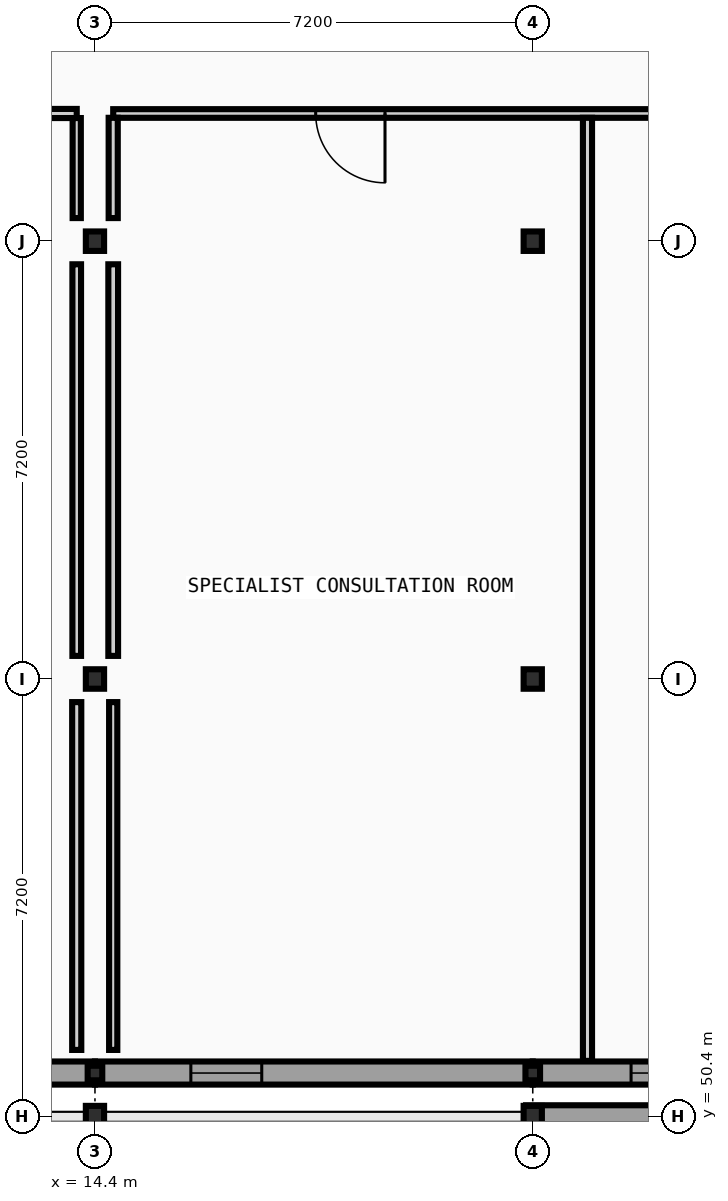
"""IFC4 building model, lengths in metres.
Left out: names, types, materials, properties, quantities, classifications, styles, units other than length and angle.
Written with IfcOpenShell. Run it as: python <this file> out.ifc"""

import sys

from ifc_helpers import new_model, si_unit, direction, frame, frame_2d, origin, origin_2d, place, context, subcontext, project, spatial, rectangle, i_section, extrude, element, fill, save


model = new_model("IFC4")
c1 = context("Model", 3, precision=1e-05, world=origin(), true_north=direction((0.0, 1.0)))
c2 = subcontext(c1, "Body", "Model", "MODEL_VIEW")
j1 = project(units=[si_unit("LENGTHUNIT", "METRE"), si_unit("PLANEANGLEUNIT", "RADIAN")], contexts=[c1])
p1 = place(None, origin())
s1 = spatial("IfcSite", under=j1, at=p1, CompositionType="ELEMENT")
p2 = place(p1, origin())
s2 = spatial("IfcBuilding", under=s1, at=p2, CompositionType="ELEMENT")
p3 = place(p2, frame((0.0, 0.0, 9.6)))
s3 = spatial("IfcBuildingStorey", under=s2, at=p3, CompositionType="ELEMENT", Elevation=9.6)
p4 = place(p3, frame((14.4, 50.4, 0.0), z_axis=(0.0, 0.0, 1.0), x_axis=(1.0, 0.0, 0.0)))
e1 = element("IfcColumn", 1, at=p4, inside=s3, PredefinedType="COLUMN", context=c2, shape_type="SweptSolid", body=[
    extrude(i_section(OverallWidth=0.3, OverallDepth=0.36, WebThickness=0.012, FlangeThickness=0.022, FilletRadius=0.027, at=origin_2d()), origin(), (0.0, 0.0, 1.0), 4.4),
])
p5 = place(p3, frame((14.4, 51.12, 0.0), z_axis=(0.0, 0.0, 1.0), x_axis=(1.0, 0.0, 0.0)))
e2 = element("IfcColumn", 2, at=p5, inside=s3, PredefinedType="COLUMN", context=c2, shape_type="SweptSolid", body=[
    extrude(i_section(OverallWidth=0.24, OverallDepth=0.24, WebThickness=0.01, FlangeThickness=0.017, FilletRadius=0.021, at=origin_2d()), origin(), (0.0, 0.0, 1.0), 4.4),
])
for number, where, z_axis, x_axis in (
    (3, (14.4, 57.6, 0.0), (0.0, 0.0, 1.0), (1.0, 0.0, 0.0)),
    (4, (14.4, 64.8, 0.0), (0.0, 0.0, 1.0), (1.0, 0.0, 0.0)),
):
    element("IfcColumn", number, at=place(p3, frame(where, z_axis=z_axis, x_axis=x_axis)), inside=s3, PredefinedType="COLUMN", context=c2, shape_type="SweptSolid", body=[
        extrude(i_section(OverallWidth=0.3, OverallDepth=0.32, WebThickness=0.011, FlangeThickness=0.021, FilletRadius=0.027, at=origin_2d()), origin(), (0.0, 0.0, 1.0), 4.4),
    ])
p6 = place(p3, frame((21.6, 50.4, 0.0), z_axis=(0.0, 0.0, 1.0), x_axis=(1.0, 0.0, 0.0)))
e5 = element("IfcColumn", 5, at=p6, inside=s3, PredefinedType="COLUMN", context=c2, shape_type="SweptSolid", body=[
    extrude(i_section(OverallWidth=0.3, OverallDepth=0.36, WebThickness=0.012, FlangeThickness=0.022, FilletRadius=0.027, at=origin_2d()), origin(), (0.0, 0.0, 1.0), 4.4),
])
p7 = place(p3, frame((21.6, 51.12, 0.0), z_axis=(0.0, 0.0, 1.0), x_axis=(1.0, 0.0, 0.0)))
e6 = element("IfcColumn", 6, at=p7, inside=s3, PredefinedType="COLUMN", context=c2, shape_type="SweptSolid", body=[
    extrude(i_section(OverallWidth=0.24, OverallDepth=0.24, WebThickness=0.01, FlangeThickness=0.017, FilletRadius=0.021, at=origin_2d()), origin(), (0.0, 0.0, 1.0), 4.4),
])
for number, where, z_axis, x_axis in (
    (7, (21.6, 57.6, 0.0), (0.0, 0.0, 1.0), (1.0, 0.0, 0.0)),
    (8, (21.6, 64.8, 0.0), (0.0, 0.0, 1.0), (1.0, 0.0, 0.0)),
):
    element("IfcColumn", number, at=place(p3, frame(where, z_axis=z_axis, x_axis=x_axis)), inside=s3, PredefinedType="COLUMN", context=c2, shape_type="SweptSolid", body=[
        extrude(i_section(OverallWidth=0.3, OverallDepth=0.32, WebThickness=0.011, FlangeThickness=0.021, FilletRadius=0.027, at=origin_2d()), origin(), (0.0, 0.0, 1.0), 4.4),
    ])
p8 = place(p3, frame((28.8, 50.4, 0.0), z_axis=(0.0, 0.0, 1.0), x_axis=(-1.0, 0.0, 0.0)))
e9 = element("IfcWall", 9, at=p8, inside=s3, PredefinedType="STANDARD", context=c2, shape_type="SweptSolid", body=[
    extrude(rectangle(XDim=7.31, YDim=0.38, at=frame_2d((3.655, 0.0))), origin(), (0.0, 0.0, 1.0), 3.895),
])
p9 = place(p8, frame((1.576, 0.0, 0.95)))
e10 = element("IfcOpeningElement", 10, at=p9, cuts=e9, PredefinedType="OPENING", context=c2, shape_type="SweptSolid", body=[
    extrude(rectangle(XDim=1.234, YDim=1.296, at=frame_2d((0.617, 0.648))), frame((0.0, 0.2, 0.0), z_axis=(0.0, -1.0, 0.0), x_axis=(1.0, 0.0, 0.0)), (0.0, 0.0, 1.0), 0.4),
])
p10 = place(p3, frame((7.2, 51.12, 0.0), z_axis=(0.0, 0.0, 1.0), x_axis=(1.0, 0.0, 0.0)))
e11 = element("IfcWall", 11, at=p10, inside=s3, PredefinedType="STANDARD", context=c2, shape_type="SweptSolid", body=[
    extrude(rectangle(XDim=7.2, YDim=0.38, at=frame_2d((3.6, 0.0))), origin(), (0.0, 0.0, 1.0), 3.875),
])
p11 = place(p10, frame((4.474, 0.0, 0.95)))
e12 = element("IfcOpeningElement", 12, at=p11, cuts=e11, PredefinedType="OPENING", context=c2, shape_type="SweptSolid", body=[
    extrude(rectangle(XDim=1.132, YDim=1.26, at=frame_2d((0.566, 0.63))), frame((0.0, 0.2, 0.0), z_axis=(0.0, -1.0, 0.0), x_axis=(1.0, 0.0, 0.0)), (0.0, 0.0, 1.0), 0.4),
])
p12 = place(p3, frame((14.4, 51.12, 0.0), z_axis=(0.0, 0.0, 1.0), x_axis=(1.0, 0.0, 0.0)))
e13 = element("IfcWall", 13, at=p12, inside=s3, PredefinedType="STANDARD", context=c2, shape_type="SweptSolid", body=[
    extrude(rectangle(XDim=7.2, YDim=0.38, at=frame_2d((3.6, 0.0))), origin(), (0.0, 0.0, 1.0), 3.875),
])
p13 = place(p12, frame((1.577, 0.0, 0.95)))
e14 = element("IfcOpeningElement", 14, at=p13, cuts=e13, PredefinedType="OPENING", context=c2, shape_type="SweptSolid", body=[
    extrude(rectangle(XDim=1.166, YDim=1.26, at=frame_2d((0.583, 0.63))), frame((0.0, 0.2, 0.0), z_axis=(0.0, -1.0, 0.0), x_axis=(1.0, 0.0, 0.0)), (0.0, 0.0, 1.0), 0.4),
])
p14 = place(p3, frame((21.6, 51.12, 0.0), z_axis=(0.0, 0.0, 1.0), x_axis=(1.0, 0.0, 0.0)))
e15 = element("IfcWall", 15, at=p14, inside=s3, PredefinedType="STANDARD", context=c2, shape_type="SweptSolid", body=[
    extrude(rectangle(XDim=7.39, YDim=0.38, at=frame_2d((3.695, 0.0))), origin(), (0.0, 0.0, 1.0), 3.875),
])
p15 = place(p14, frame((1.617, 0.0, 0.95)))
e16 = element("IfcOpeningElement", 16, at=p15, cuts=e15, PredefinedType="OPENING", context=c2, shape_type="SweptSolid", body=[
    extrude(rectangle(XDim=1.2, YDim=1.26, at=frame_2d((0.6, 0.63))), frame((0.0, 0.2, 0.0), z_axis=(0.0, -1.0, 0.0), x_axis=(1.0, 0.0, 0.0)), (0.0, 0.0, 1.0), 0.4),
])
p16 = place(p14, frame((4.573, 0.0, 0.95)))
e17 = element("IfcOpeningElement", 17, at=p16, cuts=e15, PredefinedType="OPENING", context=c2, shape_type="SweptSolid", body=[
    extrude(rectangle(XDim=1.2, YDim=1.26, at=frame_2d((0.6, 0.63))), frame((0.0, 0.2, 0.0), z_axis=(0.0, -1.0, 0.0), x_axis=(1.0, 0.0, 0.0)), (0.0, 0.0, 1.0), 0.4),
])
p17 = place(p3, frame((10.65, 66.9, 0.0), z_axis=(0.0, 0.0, 1.0), x_axis=(1.0, 0.0, 0.0)))
e18 = element("IfcWall", 18, at=p17, inside=s3, PredefinedType="PARTITIONING", context=c2, shape_type="SweptSolid", body=[
    extrude(rectangle(XDim=3.45, YDim=0.15, at=frame_2d((1.725, 0.0))), origin(), (0.0, 0.0, 1.0), 4.2),
])
p18 = place(p17, frame((0.45, 0.0, 0.0)))
e19 = element("IfcOpeningElement", 19, at=p18, cuts=e18, PredefinedType="OPENING", context=c2, shape_type="SweptSolid", body=[
    extrude(rectangle(XDim=1.036, YDim=2.152, at=frame_2d((0.518, 1.076))), frame((0.0, 0.085, 0.0), z_axis=(0.0, -1.0, 0.0), x_axis=(1.0, 0.0, 0.0)), (0.0, 0.0, 1.0), 0.17),
])
p19 = place(p3, frame((14.7, 66.9, 0.0), z_axis=(0.0, 0.0, 1.0), x_axis=(1.0, 0.0, 0.0)))
e20 = element("IfcWall", 20, at=p19, inside=s3, PredefinedType="PARTITIONING", context=c2, shape_type="SweptSolid", body=[
    extrude(rectangle(XDim=13.9, YDim=0.142, at=frame_2d((6.95, 0.0))), origin(), (0.0, 0.0, 1.0), 4.2),
])
p20 = place(p19, frame((10.293, 0.0, 0.0)))
e21 = element("IfcOpeningElement", 21, at=p20, cuts=e20, PredefinedType="OPENING", context=c2, shape_type="SweptSolid", body=[
    extrude(rectangle(XDim=1.114, YDim=2.152, at=frame_2d((0.557, 1.076))), frame((0.0, 0.081, 0.0), z_axis=(0.0, -1.0, 0.0), x_axis=(1.0, 0.0, 0.0)), (0.0, 0.0, 1.0), 0.162),
])
p21 = place(p19, frame((3.33, 0.0, 0.0)))
e22 = element("IfcOpeningElement", 22, at=p21, cuts=e20, PredefinedType="OPENING", context=c2, shape_type="SweptSolid", body=[
    extrude(rectangle(XDim=1.14, YDim=2.152, at=frame_2d((0.57, 1.076))), frame((0.0, 0.081, 0.0), z_axis=(0.0, -1.0, 0.0), x_axis=(1.0, 0.0, 0.0)), (0.0, 0.0, 1.0), 0.162),
])
p22 = place(p3, frame((14.1, 51.5, 0.0), z_axis=(0.0, 0.0, 1.0), x_axis=(0.0, 1.0, 0.0)))
e23 = element("IfcWall", 23, at=p22, inside=s3, PredefinedType="PARTITIONING", context=c2, shape_type="SweptSolid", body=[
    extrude(rectangle(XDim=5.72, YDim=0.15, at=frame_2d((2.86, 0.0))), origin(), (0.0, 0.0, 1.0), 3.875),
])
p23 = place(p3, frame((14.1, 57.98, 0.0), z_axis=(0.0, 0.0, 1.0), x_axis=(0.0, 1.0, 0.0)))
e24 = element("IfcWall", 24, at=p23, inside=s3, PredefinedType="PARTITIONING", context=c2, shape_type="SweptSolid", body=[
    extrude(rectangle(XDim=6.44, YDim=0.142, at=frame_2d((3.22, 0.0))), origin(), (0.0, 0.0, 1.0), 3.895),
])
p24 = place(p3, frame((14.1, 65.18, 0.0), z_axis=(0.0, 0.0, 1.0), x_axis=(0.0, 1.0, 0.0)))
e25 = element("IfcWall", 25, at=p24, inside=s3, PredefinedType="PARTITIONING", context=c2, shape_type="SweptSolid", body=[
    extrude(rectangle(XDim=1.645, YDim=0.135, at=frame_2d((0.823, 0.0))), origin(), (0.0, 0.0, 1.0), 4.2),
])
p25 = place(p3, frame((14.7, 51.5, 0.0), z_axis=(0.0, 0.0, 1.0), x_axis=(0.0, 1.0, 0.0)))
e26 = element("IfcWall", 26, at=p25, inside=s3, PredefinedType="PARTITIONING", context=c2, shape_type="SweptSolid", body=[
    extrude(rectangle(XDim=5.72, YDim=0.135, at=frame_2d((2.86, 0.0))), origin(), (0.0, 0.0, 1.0), 4.2),
])
p26 = place(p3, frame((14.7, 57.98, 0.0), z_axis=(0.0, 0.0, 1.0), x_axis=(0.0, 1.0, 0.0)))
e27 = element("IfcWall", 27, at=p26, inside=s3, PredefinedType="PARTITIONING", context=c2, shape_type="SweptSolid", body=[
    extrude(rectangle(XDim=6.44, YDim=0.16, at=frame_2d((3.22, 0.0))), origin(), (0.0, 0.0, 1.0), 3.895),
])
p27 = place(p3, frame((14.7, 65.18, 0.0), z_axis=(0.0, 0.0, 1.0), x_axis=(0.0, 1.0, 0.0)))
e28 = element("IfcWall", 28, at=p27, inside=s3, PredefinedType="PARTITIONING", context=c2, shape_type="SweptSolid", body=[
    extrude(rectangle(XDim=1.649, YDim=0.15, at=frame_2d((0.825, 0.0))), origin(), (0.0, 0.0, 1.0), 3.895),
])
p28 = place(p3, frame((22.5, 51.32, 0.0), z_axis=(0.0, 0.0, 1.0), x_axis=(0.0, 1.0, 0.0)))
e29 = element("IfcWall", 29, at=p28, inside=s3, PredefinedType="PARTITIONING", context=c2, shape_type="SweptSolid", body=[
    extrude(rectangle(XDim=15.509, YDim=0.15, at=frame_2d((7.754, 0.0))), origin(), (0.0, 0.0, 1.0), 4.2),
])
p29 = place(p13, origin())
e30 = element("IfcWindow", 30, at=p29, inside=s3, PartitioningType="SINGLE_PANEL", PredefinedType="WINDOW", context=c2, shape_type="SweptSolid", body=[
    extrude(rectangle(XDim=1.166, YDim=1.26, at=frame_2d((0.583, 0.63))), frame((0.0, 0.03, 0.0), z_axis=(0.0, -1.0, 0.0), x_axis=(1.0, 0.0, 0.0)), (0.0, 0.0, 1.0), 0.06),
])
fill(e14, e30)
p30 = place(p15, origin())
e31 = element("IfcWindow", 31, at=p30, inside=s3, PartitioningType="SINGLE_PANEL", PredefinedType="WINDOW", context=c2, shape_type="SweptSolid", body=[
    extrude(rectangle(XDim=1.2, YDim=1.26, at=frame_2d((0.6, 0.63))), frame((0.0, 0.03, 0.0), z_axis=(0.0, -1.0, 0.0), x_axis=(1.0, 0.0, 0.0)), (0.0, 0.0, 1.0), 0.06),
])
fill(e16, e31)
p31 = place(p21, origin())
e32 = element("IfcDoor", 32, at=p31, inside=s3, OperationType="SINGLE_SWING_RIGHT", PredefinedType="DOOR", context=c2, shape_type="SweptSolid", body=[
    extrude(rectangle(XDim=1.14, YDim=2.152, at=frame_2d((0.57, 1.076))), frame((0.0, 0.025, 0.0), z_axis=(0.0, -1.0, 0.0), x_axis=(1.0, 0.0, 0.0)), (0.0, 0.0, 1.0), 0.05),
])
fill(e22, e32)
save(model, sys.argv[1])
